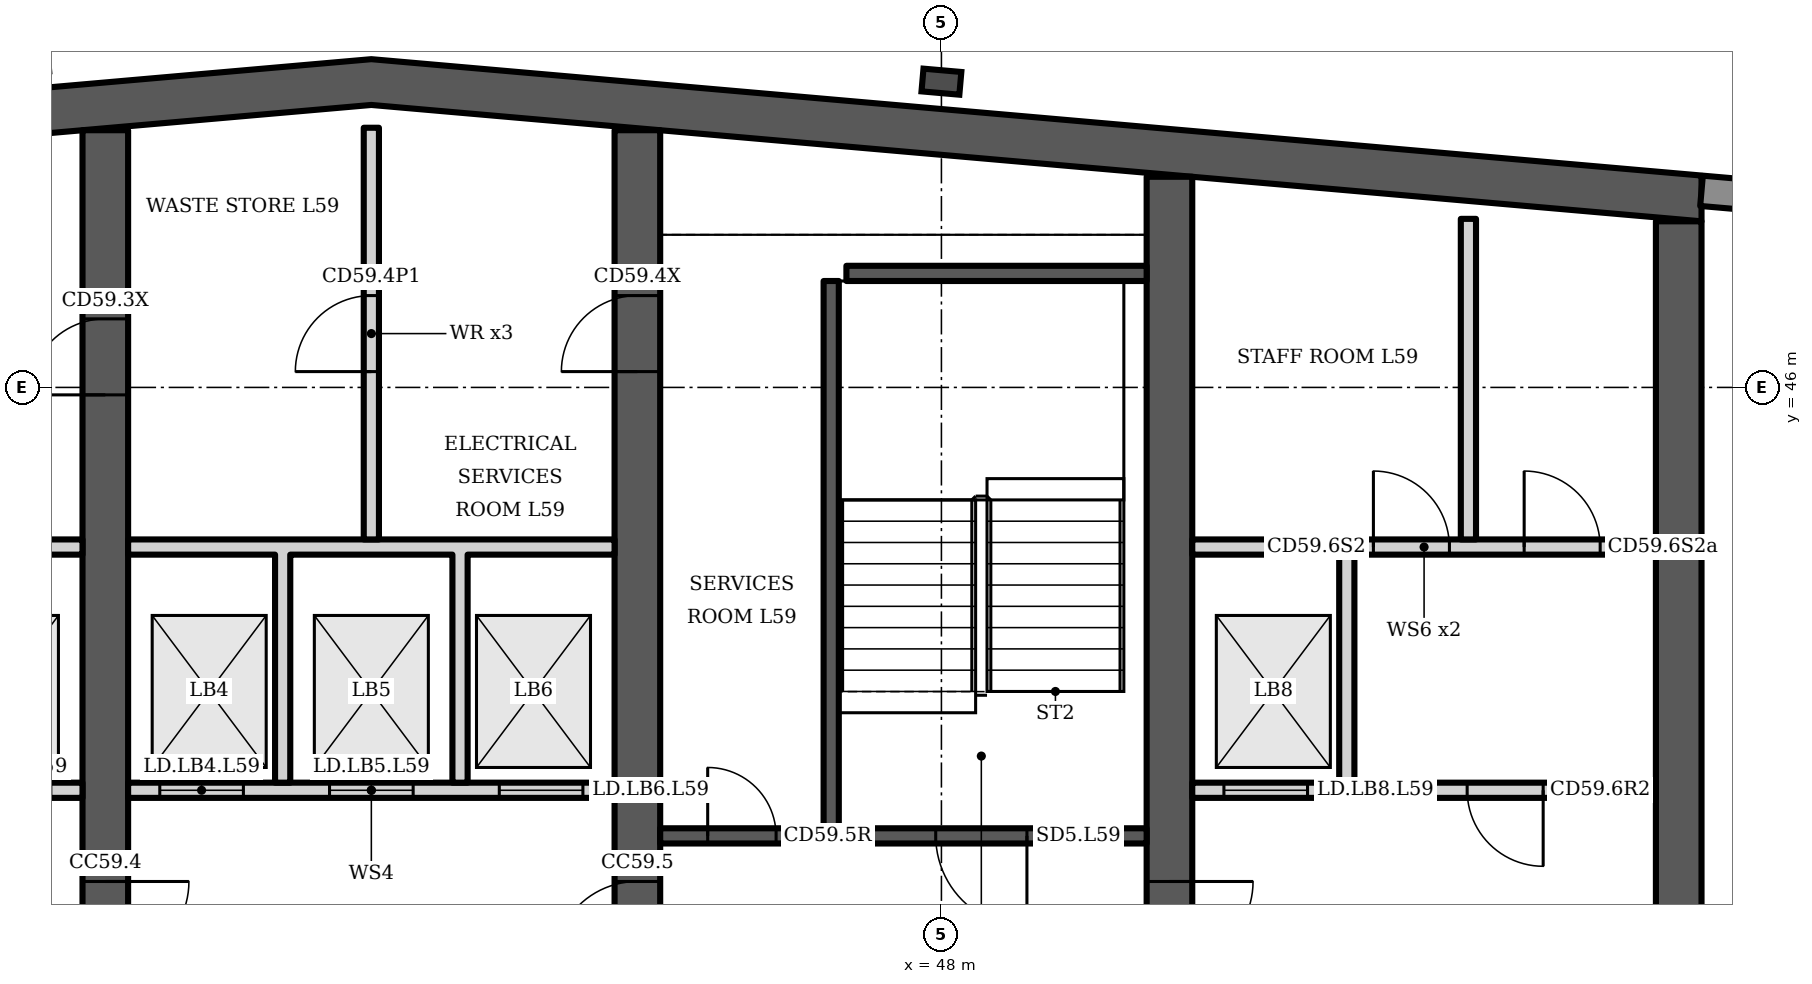
"""IFC4 building model, lengths in metres.
Left out: names, types, materials, properties, quantities, classifications, styles, units other than length and angle.
Written with IfcOpenShell. Run it as: python <this file> out.ifc"""

import sys

from ifc_helpers import new_model, si_unit, direction, frame, frame_2d, origin, origin_2d, place, context, subcontext, project, spatial, polyline, rectangle, i_section, outline, extrude, element, fill, save


model = new_model("IFC4")
c1 = context("Model", 3, precision=1e-05, world=origin(), true_north=direction((0.0, 1.0)))
c2 = subcontext(c1, "Body", "Model", "MODEL_VIEW")
j1 = project(units=[si_unit("LENGTHUNIT", "METRE"), si_unit("PLANEANGLEUNIT", "RADIAN")], contexts=[c1])
p1 = place(None, origin())
s1 = spatial("IfcSite", under=j1, at=p1, CompositionType="ELEMENT")
p2 = place(p1, origin())
s2 = spatial("IfcBuilding", under=s1, at=p2, CompositionType="ELEMENT")
p3 = place(p2, frame((0.0, 0.0, 235.9)))
s3 = spatial("IfcBuildingStorey", under=s2, at=p3, CompositionType="ELEMENT", Elevation=235.9)
p4 = place(p3, origin())
e1 = element("IfcWall", 1, at=p4, inside=s3, PredefinedType="SHEAR", context=c2, shape_type="SweptSolid", body=[
    extrude(outline(polyline([(23.0, 48.185), (40.5, 49.716), (58.0, 48.185), (58.0, 48.787), (40.5, 50.318), (23.0, 48.787), (23.0, 48.185)])), origin(), (0.0, 0.0, 1.0), 3.6),
])
p5 = place(p3, frame((37.0, 34.6, 0.0), z_axis=(0.0, 0.0, 1.0), x_axis=(0.0, 1.0, 0.0)))
e2 = element("IfcWall", 2, at=p5, inside=s3, PredefinedType="SHEAR", context=c2, shape_type="SweptSolid", body=[
    extrude(rectangle(XDim=14.784, YDim=0.6, at=frame_2d((7.392, 0.0))), origin(), (0.0, 0.0, 1.0), 3.6),
])
p6 = place(p5, frame((11.302, 0.0, 0.0)))
e3 = element("IfcOpeningElement", 3, at=p6, cuts=e2, PredefinedType="OPENING", context=c2, shape_type="SweptSolid", body=[
    extrude(rectangle(XDim=1.0, YDim=2.1, at=frame_2d((0.5, 1.05))), frame((0.0, 0.31, 0.0), z_axis=(0.0, -1.0, 0.0), x_axis=(1.0, 0.0, 0.0)), (0.0, 0.0, 1.0), 0.62),
])
p7 = place(p5, frame((3.8, 0.0, 0.0)))
e4 = element("IfcOpeningElement", 4, at=p7, cuts=e2, PredefinedType="OPENING", context=c2, shape_type="SweptSolid", body=[
    extrude(rectangle(XDim=1.1, YDim=2.1, at=frame_2d((0.55, 1.05))), frame((0.0, 0.31, 0.0), z_axis=(0.0, -1.0, 0.0), x_axis=(1.0, 0.0, 0.0)), (0.0, 0.0, 1.0), 0.62),
])
p8 = place(p3, frame((44.0, 34.6, 0.0), z_axis=(0.0, 0.0, 1.0), x_axis=(0.0, 1.0, 0.0)))
e5 = element("IfcWall", 5, at=p8, inside=s3, PredefinedType="SHEAR", context=c2, shape_type="SweptSolid", body=[
    extrude(rectangle(XDim=14.784, YDim=0.6, at=frame_2d((7.392, 0.0))), origin(), (0.0, 0.0, 1.0), 3.6),
])
p9 = place(p8, frame((11.608, 0.0, 0.0)))
e6 = element("IfcOpeningElement", 6, at=p9, cuts=e5, PredefinedType="OPENING", context=c2, shape_type="SweptSolid", body=[
    extrude(rectangle(XDim=1.0, YDim=2.1, at=frame_2d((0.5, 1.05))), frame((0.0, 0.31, 0.0), z_axis=(0.0, -1.0, 0.0), x_axis=(1.0, 0.0, 0.0)), (0.0, 0.0, 1.0), 0.62),
])
p10 = place(p8, frame((3.8, 0.0, 0.0)))
e7 = element("IfcOpeningElement", 7, at=p10, cuts=e5, PredefinedType="OPENING", context=c2, shape_type="SweptSolid", body=[
    extrude(rectangle(XDim=1.1, YDim=2.1, at=frame_2d((0.55, 1.05))), frame((0.0, 0.31, 0.0), z_axis=(0.0, -1.0, 0.0), x_axis=(1.0, 0.0, 0.0)), (0.0, 0.0, 1.0), 0.62),
])
p11 = place(p3, frame((51.0, 34.6, 0.0), z_axis=(0.0, 0.0, 1.0), x_axis=(0.0, 1.0, 0.0)))
e8 = element("IfcWall", 8, at=p11, inside=s3, PredefinedType="SHEAR", context=c2, shape_type="SweptSolid", body=[
    extrude(rectangle(XDim=14.171, YDim=0.6, at=frame_2d((7.085, 0.0))), origin(), (0.0, 0.0, 1.0), 3.6),
])
p12 = place(p11, frame((3.8, 0.0, 0.0)))
e9 = element("IfcOpeningElement", 9, at=p12, cuts=e8, PredefinedType="OPENING", context=c2, shape_type="SweptSolid", body=[
    extrude(rectangle(XDim=1.1, YDim=2.1, at=frame_2d((0.55, 1.05))), frame((0.0, 0.31, 0.0), z_axis=(0.0, -1.0, 0.0), x_axis=(1.0, 0.0, 0.0)), (0.0, 0.0, 1.0), 0.62),
])
p13 = place(p3, frame((57.7, 34.6, 0.0), z_axis=(0.0, 0.0, 1.0), x_axis=(0.0, 1.0, 0.0)))
e10 = element("IfcWall", 10, at=p13, inside=s3, PredefinedType="SHEAR", context=c2, shape_type="SweptSolid", body=[
    extrude(rectangle(XDim=13.585, YDim=0.6, at=frame_2d((6.792, 0.0))), origin(), (0.0, 0.0, 1.0), 3.6),
])
p14 = place(p3, frame((48.0, 50.022, 0.0), z_axis=(0.0, 0.0, 1.0), x_axis=(0.087156, 0.996197, 0.0)))
e11 = element("IfcColumn", 11, at=p14, inside=s3, PredefinedType="COLUMN", context=c2, shape_type="SweptSolid", body=[
    extrude(i_section(OverallWidth=0.3, OverallDepth=0.5, WebThickness=0.014, FlangeThickness=0.028, FilletRadius=0.027, at=origin_2d()), origin(), (0.0, 0.0, 1.0), 3.6),
])
p15 = place(p3, frame((60.983, 48.326, 0.0), z_axis=(0.0, 0.0, 1.0), x_axis=(-0.996194, 0.087168, 0.0)))
e12 = element("IfcWall", 12, at=p15, inside=s3, PredefinedType="SOLIDWALL", context=c2, shape_type="SweptSolid", body=[
    extrude(rectangle(XDim=2.994, YDim=0.4, at=frame_2d((1.497, 0.0))), origin(), (0.0, 0.0, 1.0), 3.2),
])
p16 = place(p3, frame((30.3, 40.7, 0.0), z_axis=(0.0, 0.0, 1.0), x_axis=(1.0, 0.0, 0.0)))
e13 = element("IfcWall", 13, at=p16, inside=s3, PredefinedType="PARTITIONING", context=c2, shape_type="SweptSolid", body=[
    extrude(rectangle(XDim=6.4, YDim=0.2, at=frame_2d((3.2, 0.0))), origin(), (0.0, 0.0, 1.0), 3.2),
])
p17 = place(p16, frame((0.417, 0.0, 0.0)))
e14 = element("IfcOpeningElement", 14, at=p17, cuts=e13, PredefinedType="OPENING", context=c2, shape_type="SweptSolid", body=[
    extrude(rectangle(XDim=1.1, YDim=2.1, at=frame_2d((0.55, 1.05))), frame((0.0, 0.11, 0.0), z_axis=(0.0, -1.0, 0.0), x_axis=(1.0, 0.0, 0.0)), (0.0, 0.0, 1.0), 0.22),
])
p18 = place(p16, frame((2.65, 0.0, 0.0)))
e15 = element("IfcOpeningElement", 15, at=p18, cuts=e13, PredefinedType="OPENING", context=c2, shape_type="SweptSolid", body=[
    extrude(rectangle(XDim=1.1, YDim=2.1, at=frame_2d((0.55, 1.05))), frame((0.0, 0.11, 0.0), z_axis=(0.0, -1.0, 0.0), x_axis=(1.0, 0.0, 0.0)), (0.0, 0.0, 1.0), 0.22),
])
p19 = place(p16, frame((4.883, 0.0, 0.0)))
e16 = element("IfcOpeningElement", 16, at=p19, cuts=e13, PredefinedType="OPENING", context=c2, shape_type="SweptSolid", body=[
    extrude(rectangle(XDim=1.1, YDim=2.1, at=frame_2d((0.55, 1.05))), frame((0.0, 0.11, 0.0), z_axis=(0.0, -1.0, 0.0), x_axis=(1.0, 0.0, 0.0)), (0.0, 0.0, 1.0), 0.22),
])
p20 = place(p3, origin())
e17 = element("IfcWall", 17, at=p20, inside=s3, PredefinedType="PARTITIONING", context=c2, shape_type="SweptSolid", body=[
    extrude(outline(polyline([(32.433, 40.8), (32.233, 40.8), (32.233, 43.8), (30.3, 43.8), (30.3, 44.0), (36.7, 44.0), (36.7, 43.8), (34.767, 43.8), (34.767, 40.8), (34.567, 40.8), (34.567, 43.8), (32.433, 43.8), (32.433, 40.8)])), origin(), (0.0, 0.0, 1.0), 3.2),
])
p21 = place(p3, frame((37.3, 40.7, 0.0), z_axis=(0.0, 0.0, 1.0), x_axis=(1.0, 0.0, 0.0)))
e18 = element("IfcWall", 18, at=p21, inside=s3, PredefinedType="PARTITIONING", context=c2, shape_type="SweptSolid", body=[
    extrude(rectangle(XDim=6.4, YDim=0.2, at=frame_2d((3.2, 0.0))), origin(), (0.0, 0.0, 1.0), 3.2),
])
p22 = place(p21, frame((0.417, 0.0, 0.0)))
e19 = element("IfcOpeningElement", 19, at=p22, cuts=e18, PredefinedType="OPENING", context=c2, shape_type="SweptSolid", body=[
    extrude(rectangle(XDim=1.1, YDim=2.1, at=frame_2d((0.55, 1.05))), frame((0.0, 0.11, 0.0), z_axis=(0.0, -1.0, 0.0), x_axis=(1.0, 0.0, 0.0)), (0.0, 0.0, 1.0), 0.22),
])
p23 = place(p21, frame((2.65, 0.0, 0.0)))
e20 = element("IfcOpeningElement", 20, at=p23, cuts=e18, PredefinedType="OPENING", context=c2, shape_type="SweptSolid", body=[
    extrude(rectangle(XDim=1.1, YDim=2.1, at=frame_2d((0.55, 1.05))), frame((0.0, 0.11, 0.0), z_axis=(0.0, -1.0, 0.0), x_axis=(1.0, 0.0, 0.0)), (0.0, 0.0, 1.0), 0.22),
])
p24 = place(p21, frame((4.883, 0.0, 0.0)))
e21 = element("IfcOpeningElement", 21, at=p24, cuts=e18, PredefinedType="OPENING", context=c2, shape_type="SweptSolid", body=[
    extrude(rectangle(XDim=1.1, YDim=2.1, at=frame_2d((0.55, 1.05))), frame((0.0, 0.11, 0.0), z_axis=(0.0, -1.0, 0.0), x_axis=(1.0, 0.0, 0.0)), (0.0, 0.0, 1.0), 0.22),
])
p25 = place(p3, origin())
e22 = element("IfcWall", 22, at=p25, inside=s3, PredefinedType="PARTITIONING", context=c2, shape_type="SweptSolid", body=[
    extrude(outline(polyline([(39.433, 40.8), (39.233, 40.8), (39.233, 43.8), (37.3, 43.8), (37.3, 44.0), (43.7, 44.0), (43.7, 43.8), (41.767, 43.8), (41.767, 40.8), (41.567, 40.8), (41.567, 43.8), (39.433, 43.8), (39.433, 40.8)])), origin(), (0.0, 0.0, 1.0), 3.2),
])
p26 = place(p3, frame((40.5, 44.0, 0.0), z_axis=(0.0, 0.0, 1.0), x_axis=(0.0, 1.0, 0.0)))
e23 = element("IfcWall", 23, at=p26, inside=s3, PredefinedType="PARTITIONING", context=c2, shape_type="SweptSolid", body=[
    extrude(rectangle(XDim=5.416, YDim=0.2, at=frame_2d((2.708, 0.0))), origin(), (0.0, 0.0, 1.0), 3.2),
])
p27 = place(p26, frame((2.208, 0.0, 0.0)))
e24 = element("IfcOpeningElement", 24, at=p27, cuts=e23, PredefinedType="OPENING", context=c2, shape_type="SweptSolid", body=[
    extrude(rectangle(XDim=1.0, YDim=2.1, at=frame_2d((0.5, 1.05))), frame((0.0, 0.11, 0.0), z_axis=(0.0, -1.0, 0.0), x_axis=(1.0, 0.0, 0.0)), (0.0, 0.0, 1.0), 0.22),
])
p28 = place(p3, frame((44.3, 40.1, 0.0), z_axis=(0.0, 0.0, 1.0), x_axis=(1.0, 0.0, 0.0)))
e25 = element("IfcWall", 25, at=p28, inside=s3, PredefinedType="SHEAR", context=c2, shape_type="SweptSolid", body=[
    extrude(rectangle(XDim=6.4, YDim=0.2, at=frame_2d((3.2, 0.0))), origin(), (0.0, 0.0, 1.0), 3.2),
])
p29 = place(p28, frame((3.625, 0.0, 0.0)))
e26 = element("IfcOpeningElement", 26, at=p29, cuts=e25, PredefinedType="OPENING", context=c2, shape_type="SweptSolid", body=[
    extrude(rectangle(XDim=1.2, YDim=2.1, at=frame_2d((0.6, 1.05))), frame((0.0, 0.11, 0.0), z_axis=(0.0, -1.0, 0.0), x_axis=(1.0, 0.0, 0.0)), (0.0, 0.0, 1.0), 0.22),
])
p30 = place(p28, frame((0.625, 0.0, 0.0)))
e27 = element("IfcOpeningElement", 27, at=p30, cuts=e25, PredefinedType="OPENING", context=c2, shape_type="SweptSolid", body=[
    extrude(rectangle(XDim=0.9, YDim=2.1, at=frame_2d((0.45, 1.05))), frame((0.0, 0.11, 0.0), z_axis=(0.0, -1.0, 0.0), x_axis=(1.0, 0.0, 0.0)), (0.0, 0.0, 1.0), 0.22),
])
p31 = place(p3, frame((46.55, 40.2, 0.0), z_axis=(0.0, 0.0, 1.0), x_axis=(0.0, 1.0, 0.0)))
e28 = element("IfcWall", 28, at=p31, inside=s3, PredefinedType="SHEAR", context=c2, shape_type="SweptSolid", body=[
    extrude(rectangle(XDim=7.2, YDim=0.2, at=frame_2d((3.6, 0.0))), origin(), (0.0, 0.0, 1.0), 3.2),
])
p32 = place(p3, frame((46.75, 47.5, 0.0), z_axis=(0.0, 0.0, 1.0), x_axis=(1.0, 0.0, 0.0)))
e29 = element("IfcWall", 29, at=p32, inside=s3, PredefinedType="SHEAR", context=c2, shape_type="SweptSolid", body=[
    extrude(rectangle(XDim=3.95, YDim=0.2, at=frame_2d((1.975, 0.0))), origin(), (0.0, 0.0, 1.0), 3.2),
])
p33 = place(p3, frame((51.3, 40.7, 0.0), z_axis=(0.0, 0.0, 1.0), x_axis=(1.0, 0.0, 0.0)))
e30 = element("IfcWall", 30, at=p33, inside=s3, PredefinedType="PARTITIONING", context=c2, shape_type="SweptSolid", body=[
    extrude(rectangle(XDim=6.1, YDim=0.2, at=frame_2d((3.05, 0.0))), origin(), (0.0, 0.0, 1.0), 3.2),
])
p34 = place(p33, frame((0.417, 0.0, 0.0)))
e31 = element("IfcOpeningElement", 31, at=p34, cuts=e30, PredefinedType="OPENING", context=c2, shape_type="SweptSolid", body=[
    extrude(rectangle(XDim=1.1, YDim=2.1, at=frame_2d((0.55, 1.05))), frame((0.0, 0.11, 0.0), z_axis=(0.0, -1.0, 0.0), x_axis=(1.0, 0.0, 0.0)), (0.0, 0.0, 1.0), 0.22),
])
p35 = place(p33, frame((3.617, 0.0, 0.0)))
e32 = element("IfcOpeningElement", 32, at=p35, cuts=e30, PredefinedType="OPENING", context=c2, shape_type="SweptSolid", body=[
    extrude(rectangle(XDim=1.0, YDim=2.1, at=frame_2d((0.5, 1.05))), frame((0.0, 0.11, 0.0), z_axis=(0.0, -1.0, 0.0), x_axis=(1.0, 0.0, 0.0)), (0.0, 0.0, 1.0), 0.22),
])
p36 = place(p3, frame((51.3, 43.9, 0.0), z_axis=(0.0, 0.0, 1.0), x_axis=(1.0, 0.0, 0.0)))
e33 = element("IfcWall", 33, at=p36, inside=s3, PredefinedType="PARTITIONING", context=c2, shape_type="SweptSolid", body=[
    extrude(rectangle(XDim=6.1, YDim=0.2, at=frame_2d((3.05, 0.0))), origin(), (0.0, 0.0, 1.0), 3.2),
])
p37 = place(p36, frame((2.383, 0.0, 0.0)))
e34 = element("IfcOpeningElement", 34, at=p37, cuts=e33, PredefinedType="OPENING", context=c2, shape_type="SweptSolid", body=[
    extrude(rectangle(XDim=1.0, YDim=2.1, at=frame_2d((0.5, 1.05))), frame((0.0, 0.11, 0.0), z_axis=(0.0, -1.0, 0.0), x_axis=(1.0, 0.0, 0.0)), (0.0, 0.0, 1.0), 0.22),
])
p38 = place(p36, frame((4.367, 0.0, 0.0)))
e35 = element("IfcOpeningElement", 35, at=p38, cuts=e33, PredefinedType="OPENING", context=c2, shape_type="SweptSolid", body=[
    extrude(rectangle(XDim=1.0, YDim=2.1, at=frame_2d((0.5, 1.05))), frame((0.0, 0.11, 0.0), z_axis=(0.0, -1.0, 0.0), x_axis=(1.0, 0.0, 0.0)), (0.0, 0.0, 1.0), 0.22),
])
p39 = place(p3, origin())
e36 = element("IfcWall", 36, at=p39, inside=s3, PredefinedType="PARTITIONING", context=c2, shape_type="SweptSolid", body=[
    extrude(outline(polyline([(53.433, 40.8), (53.433, 43.8), (53.233, 43.8), (53.233, 40.8), (53.433, 40.8)])), origin(), (0.0, 0.0, 1.0), 3.2),
])
p40 = place(p3, frame((54.933, 44.0, 0.0), z_axis=(0.0, 0.0, 1.0), x_axis=(0.0, 1.0, 0.0)))
e37 = element("IfcWall", 37, at=p40, inside=s3, PredefinedType="PARTITIONING", context=c2, shape_type="SweptSolid", body=[
    extrude(rectangle(XDim=4.218, YDim=0.2, at=frame_2d((2.109, 0.0))), origin(), (0.0, 0.0, 1.0), 3.2),
])
p41 = place(p6, origin())
e38 = element("IfcDoor", 38, at=p41, inside=s3, OperationType="SINGLE_SWING_LEFT", PredefinedType="DOOR", context=c2, shape_type="SweptSolid", body=[
    extrude(rectangle(XDim=1.0, YDim=2.1, at=frame_2d((0.5, 1.05))), frame((0.0, 0.025, 0.0), z_axis=(0.0, -1.0, 0.0), x_axis=(1.0, 0.0, 0.0)), (0.0, 0.0, 1.0), 0.05),
])
fill(e3, e38)
p42 = place(p22, origin())
e39 = element("IfcDoor", 39, at=p42, inside=s3, OperationType="DOUBLE_DOOR_SLIDING", PredefinedType="DOOR", context=c2, shape_type="SweptSolid", body=[
    extrude(rectangle(XDim=1.1, YDim=2.1, at=frame_2d((0.55, 1.05))), frame((0.0, 0.025, 0.0), z_axis=(0.0, -1.0, 0.0), x_axis=(1.0, 0.0, 0.0)), (0.0, 0.0, 1.0), 0.05),
])
fill(e19, e39)
p43 = place(p23, origin())
e40 = element("IfcDoor", 40, at=p43, inside=s3, OperationType="DOUBLE_DOOR_SLIDING", PredefinedType="DOOR", context=c2, shape_type="SweptSolid", body=[
    extrude(rectangle(XDim=1.1, YDim=2.1, at=frame_2d((0.55, 1.05))), frame((0.0, 0.025, 0.0), z_axis=(0.0, -1.0, 0.0), x_axis=(1.0, 0.0, 0.0)), (0.0, 0.0, 1.0), 0.05),
])
fill(e20, e40)
p44 = place(p24, origin())
e41 = element("IfcDoor", 41, at=p44, inside=s3, OperationType="DOUBLE_DOOR_SLIDING", PredefinedType="DOOR", context=c2, shape_type="SweptSolid", body=[
    extrude(rectangle(XDim=1.1, YDim=2.1, at=frame_2d((0.55, 1.05))), frame((0.0, 0.025, 0.0), z_axis=(0.0, -1.0, 0.0), x_axis=(1.0, 0.0, 0.0)), (0.0, 0.0, 1.0), 0.05),
])
fill(e21, e41)
p45 = place(p27, origin())
e42 = element("IfcDoor", 42, at=p45, inside=s3, OperationType="SINGLE_SWING_LEFT", PredefinedType="DOOR", context=c2, shape_type="SweptSolid", body=[
    extrude(rectangle(XDim=1.0, YDim=2.1, at=frame_2d((0.5, 1.05))), frame((0.0, 0.025, 0.0), z_axis=(0.0, -1.0, 0.0), x_axis=(1.0, 0.0, 0.0)), (0.0, 0.0, 1.0), 0.05),
])
fill(e24, e42)
p46 = place(p9, origin())
e43 = element("IfcDoor", 43, at=p46, inside=s3, OperationType="SINGLE_SWING_LEFT", PredefinedType="DOOR", context=c2, shape_type="SweptSolid", body=[
    extrude(rectangle(XDim=1.0, YDim=2.1, at=frame_2d((0.5, 1.05))), frame((0.0, 0.025, 0.0), z_axis=(0.0, -1.0, 0.0), x_axis=(1.0, 0.0, 0.0)), (0.0, 0.0, 1.0), 0.05),
])
fill(e6, e43)
p47 = place(p29, origin())
e44 = element("IfcDoor", 44, at=p47, inside=s3, OperationType="SINGLE_SWING_RIGHT", PredefinedType="DOOR", context=c2, shape_type="SweptSolid", body=[
    extrude(rectangle(XDim=1.2, YDim=2.1, at=frame_2d((0.6, 1.05))), frame((0.0, 0.025, 0.0), z_axis=(0.0, -1.0, 0.0), x_axis=(1.0, 0.0, 0.0)), (0.0, 0.0, 1.0), 0.05),
])
fill(e26, e44)
p48 = place(p30, origin())
e45 = element("IfcDoor", 45, at=p48, inside=s3, OperationType="SINGLE_SWING_LEFT", PredefinedType="DOOR", context=c2, shape_type="SweptSolid", body=[
    extrude(rectangle(XDim=0.9, YDim=2.1, at=frame_2d((0.45, 1.05))), frame((0.0, 0.025, 0.0), z_axis=(0.0, -1.0, 0.0), x_axis=(1.0, 0.0, 0.0)), (0.0, 0.0, 1.0), 0.05),
])
fill(e27, e45)
p49 = place(p34, origin())
e46 = element("IfcDoor", 46, at=p49, inside=s3, OperationType="DOUBLE_DOOR_SLIDING", PredefinedType="DOOR", context=c2, shape_type="SweptSolid", body=[
    extrude(rectangle(XDim=1.1, YDim=2.1, at=frame_2d((0.55, 1.05))), frame((0.0, 0.025, 0.0), z_axis=(0.0, -1.0, 0.0), x_axis=(1.0, 0.0, 0.0)), (0.0, 0.0, 1.0), 0.05),
])
fill(e31, e46)
p50 = place(p35, origin())
e47 = element("IfcDoor", 47, at=p50, inside=s3, OperationType="SINGLE_SWING_RIGHT", PredefinedType="DOOR", context=c2, shape_type="SweptSolid", body=[
    extrude(rectangle(XDim=1.0, YDim=2.1, at=frame_2d((0.5, 1.05))), frame((0.0, 0.025, 0.0), z_axis=(0.0, -1.0, 0.0), x_axis=(1.0, 0.0, 0.0)), (0.0, 0.0, 1.0), 0.05),
])
fill(e32, e47)
p51 = place(p37, origin())
e48 = element("IfcDoor", 48, at=p51, inside=s3, OperationType="SINGLE_SWING_LEFT", PredefinedType="DOOR", context=c2, shape_type="SweptSolid", body=[
    extrude(rectangle(XDim=1.0, YDim=2.1, at=frame_2d((0.5, 1.05))), frame((0.0, 0.025, 0.0), z_axis=(0.0, -1.0, 0.0), x_axis=(1.0, 0.0, 0.0)), (0.0, 0.0, 1.0), 0.05),
])
fill(e34, e48)
p52 = place(p38, origin())
e49 = element("IfcDoor", 49, at=p52, inside=s3, OperationType="SINGLE_SWING_LEFT", PredefinedType="DOOR", context=c2, shape_type="SweptSolid", body=[
    extrude(rectangle(XDim=1.0, YDim=2.1, at=frame_2d((0.5, 1.05))), frame((0.0, 0.025, 0.0), z_axis=(0.0, -1.0, 0.0), x_axis=(1.0, 0.0, 0.0)), (0.0, 0.0, 1.0), 0.05),
])
fill(e35, e49)
p53 = place(p7, origin())
e50 = element("IfcDoor", 50, at=p53, inside=s3, OperationType="SINGLE_SWING_RIGHT", PredefinedType="DOOR", context=c2, shape_type="SweptSolid", body=[
    extrude(rectangle(XDim=1.1, YDim=2.1, at=frame_2d((0.55, 1.05))), frame((0.0, 0.025, 0.0), z_axis=(0.0, -1.0, 0.0), x_axis=(1.0, 0.0, 0.0)), (0.0, 0.0, 1.0), 0.05),
])
fill(e4, e50)
p54 = place(p10, origin())
e51 = element("IfcDoor", 51, at=p54, inside=s3, OperationType="SINGLE_SWING_LEFT", PredefinedType="DOOR", context=c2, shape_type="SweptSolid", body=[
    extrude(rectangle(XDim=1.1, YDim=2.1, at=frame_2d((0.55, 1.05))), frame((0.0, 0.025, 0.0), z_axis=(0.0, -1.0, 0.0), x_axis=(1.0, 0.0, 0.0)), (0.0, 0.0, 1.0), 0.05),
])
fill(e7, e51)
p55 = place(p12, origin())
e52 = element("IfcDoor", 52, at=p55, inside=s3, OperationType="SINGLE_SWING_RIGHT", PredefinedType="DOOR", context=c2, shape_type="SweptSolid", body=[
    extrude(rectangle(XDim=1.1, YDim=2.1, at=frame_2d((0.55, 1.05))), frame((0.0, 0.025, 0.0), z_axis=(0.0, -1.0, 0.0), x_axis=(1.0, 0.0, 0.0)), (0.0, 0.0, 1.0), 0.05),
])
fill(e9, e52)
save(model, sys.argv[1])
